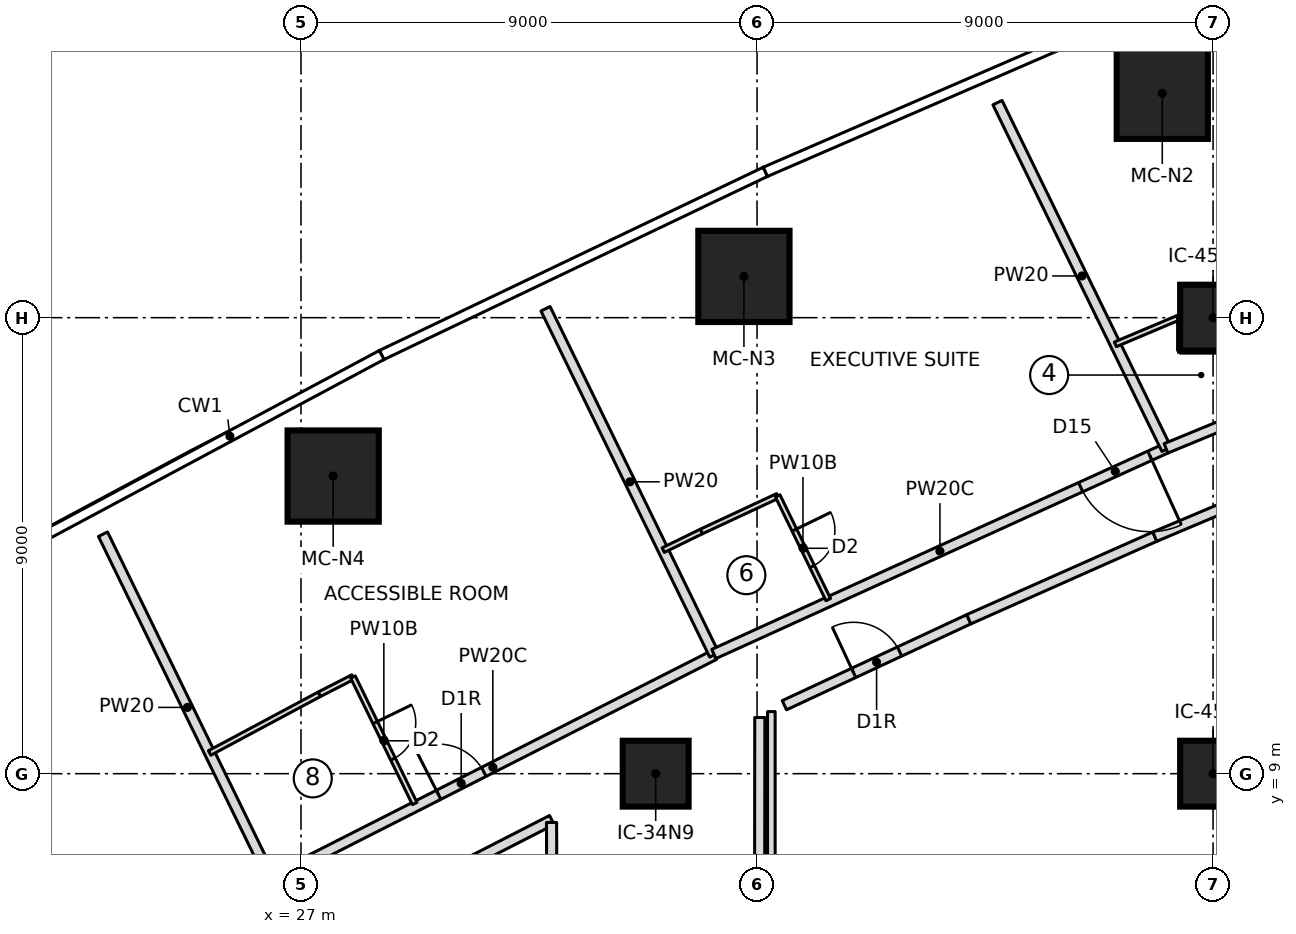
"""IFC4 building model, lengths in metres.
Left out: names, types, materials, properties, quantities, classifications, styles, units other than length and angle.
Written with IfcOpenShell. Run it as: python <this file> out.ifc"""

import sys

from ifc_helpers import new_model, si_unit, direction, frame, frame_2d, origin, origin_2d, place, context, subcontext, project, spatial, rectangle, extrude, element, fill, save


model = new_model("IFC4")
c1 = context("Model", 3, precision=1e-05, world=origin(), true_north=direction((0.0, 1.0)))
c2 = subcontext(c1, "Body", "Model", "MODEL_VIEW")
j1 = project(units=[si_unit("LENGTHUNIT", "METRE"), si_unit("PLANEANGLEUNIT", "RADIAN")], contexts=[c1])
p1 = place(None, origin())
s1 = spatial("IfcSite", under=j1, at=p1, CompositionType="ELEMENT")
p2 = place(p1, origin())
s2 = spatial("IfcBuilding", under=s1, at=p2, CompositionType="ELEMENT")
p3 = place(p2, frame((0.0, 0.0, 57.35)))
s3 = spatial("IfcBuildingStorey", under=s2, at=p3, CompositionType="ELEMENT", Elevation=57.35)
for number, where, z_axis, x_axis in (
    (1, (43.998, 22.428, 0.0), (0.0, 0.0, 1.0), (1.0, 0.0, 0.0)),
    (2, (35.741, 18.814, 0.0), (0.0, 0.0, 1.0), (1.0, 0.0, 0.0)),
    (3, (27.635, 14.874, 0.0), (0.0, 0.0, 1.0), (1.0, 0.0, 0.0)),
):
    element("IfcColumn", number, at=place(p3, frame(where, z_axis=z_axis, x_axis=x_axis)), inside=s3, PredefinedType="COLUMN", context=c2, shape_type="SweptSolid", body=[
        extrude(rectangle(XDim=1.8, YDim=1.8, at=origin_2d()), origin(), (0.0, 0.0, 1.0), 3.55),
    ])
for number, where, z_axis, x_axis in (
    (4, (34.0, 9.0, 0.0), (0.0, 0.0, 1.0), (1.0, 0.0, 0.0)),
    (5, (45.0, 9.0, 0.0), (0.0, 0.0, 1.0), (1.0, 0.0, 0.0)),
    (6, (45.0, 18.0, 0.0), (0.0, 0.0, 1.0), (1.0, 0.0, 0.0)),
):
    element("IfcColumn", number, at=place(p3, frame(where, z_axis=z_axis, x_axis=x_axis)), inside=s3, PredefinedType="COLUMN", context=c2, shape_type="SweptSolid", body=[
        extrude(rectangle(XDim=1.3, YDim=1.3, at=origin_2d()), origin(), (0.0, 0.0, 1.0), 3.55),
    ])
p4 = place(p3, frame((26.425, 6.89, 0.0), z_axis=(0.0, 0.0, 1.0), x_axis=(-0.438202895602, 0.898876088394, 0.0)))
e7 = element("IfcWall", 7, at=p4, inside=s3, PredefinedType="PARTITIONING", context=c2, shape_type="SweptSolid", body=[
    extrude(rectangle(XDim=7.605, YDim=0.2, at=frame_2d((3.803, 0.0))), origin(), (0.0, 0.0, 1.0), 3.25),
])
p5 = place(p3, frame((26.417, 6.908, 0.0), z_axis=(0.0, 0.0, 1.0), x_axis=(0.891700643128, 0.452625632334, 0.0)))
e8 = element("IfcWall", 8, at=p5, inside=s3, PredefinedType="PARTITIONING", context=c2, shape_type="SweptSolid", body=[
    extrude(rectangle(XDim=9.801, YDim=0.2, at=frame_2d((4.901, 0.0))), origin(), (0.0, 0.0, 1.0), 3.25),
])
p6 = place(p5, frame((3.7, 0.0, 0.0)))
e9 = element("IfcOpeningElement", 9, at=p6, cuts=e8, PredefinedType="OPENING", context=c2, shape_type="SweptSolid", body=[
    extrude(rectangle(XDim=1.0, YDim=2.1, at=frame_2d((0.5, 1.05))), frame((0.0, 0.11, 0.0), z_axis=(0.0, -1.0, 0.0), x_axis=(1.0, 0.0, 0.0)), (0.0, 0.0, 1.0), 0.22),
])
p7 = place(p3, frame((25.198, 9.409, 0.0), z_axis=(0.0, 0.0, 1.0), x_axis=(0.881658684569, 0.471887660279, 0.0)))
e10 = element("IfcWall", 10, at=p7, inside=s3, PredefinedType="PARTITIONING", context=c2, shape_type="SweptSolid", body=[
    extrude(rectangle(XDim=2.457, YDim=0.1, at=frame_2d((1.228, 0.0))), origin(), (0.0, 0.0, 1.0), 3.25),
])
p8 = place(p3, frame((27.363, 10.568, 0.0), z_axis=(0.0, 0.0, 1.0), x_axis=(0.890195653003, 0.455578422858, 0.0)))
e11 = element("IfcWall", 11, at=p8, inside=s3, PredefinedType="PARTITIONING", context=c2, shape_type="SweptSolid", body=[
    extrude(rectangle(XDim=0.745, YDim=0.1, at=frame_2d((0.373, 0.0))), origin(), (0.0, 0.0, 1.0), 3.25),
])
p9 = place(p3, frame((28.027, 10.907, 0.0), z_axis=(0.0, 0.0, 1.0), x_axis=(0.438189818179, -0.898882463531, 0.0)))
e12 = element("IfcWall", 12, at=p9, inside=s3, PredefinedType="PARTITIONING", context=c2, shape_type="SweptSolid", body=[
    extrude(rectangle(XDim=2.777, YDim=0.1, at=frame_2d((1.389, 0.0))), origin(), (0.0, 0.0, 1.0), 3.25),
])
p10 = place(p9, frame((1.0, 0.0, 0.0)))
e13 = element("IfcOpeningElement", 13, at=p10, cuts=e12, PredefinedType="OPENING", context=c2, shape_type="SweptSolid", body=[
    extrude(rectangle(XDim=0.8, YDim=2.1, at=frame_2d((0.4, 1.05))), frame((0.0, 0.06, 0.0), z_axis=(0.0, -1.0, 0.0), x_axis=(1.0, 0.0, 0.0)), (0.0, 0.0, 1.0), 0.12),
])
p11 = place(p3, frame((35.156, 11.344, 0.0), z_axis=(0.0, 0.0, 1.0), x_axis=(-0.438196407286, 0.898879251425, 0.0)))
e14 = element("IfcWall", 14, at=p11, inside=s3, PredefinedType="PARTITIONING", context=c2, shape_type="SweptSolid", body=[
    extrude(rectangle(XDim=7.6, YDim=0.2, at=frame_2d((3.8, 0.0))), origin(), (0.0, 0.0, 1.0), 3.25),
])
p12 = place(p3, frame((44.072, 15.421, 0.0), z_axis=(0.0, 0.0, 1.0), x_axis=(-0.910287143541, -0.413977434534, 0.0)))
e15 = element("IfcWall", 15, at=p12, inside=s3, PredefinedType="PARTITIONING", context=c2, shape_type="SweptSolid", body=[
    extrude(rectangle(XDim=9.803, YDim=0.2, at=frame_2d((4.902, 0.0))), origin(), (0.0, 0.0, 1.0), 3.25),
])
p13 = place(p12, frame((0.35, 0.0, 0.0)))
e16 = element("IfcOpeningElement", 16, at=p13, cuts=e15, PredefinedType="OPENING", context=c2, shape_type="SweptSolid", body=[
    extrude(rectangle(XDim=1.5, YDim=2.1, at=frame_2d((0.75, 1.05))), frame((0.0, 0.11, 0.0), z_axis=(0.0, -1.0, 0.0), x_axis=(1.0, 0.0, 0.0)), (0.0, 0.0, 1.0), 0.22),
])
p14 = place(p3, frame((34.148, 13.412, 0.0), z_axis=(0.0, 0.0, 1.0), x_axis=(0.89828999443, 0.43940310184, 0.0)))
e17 = element("IfcWall", 17, at=p14, inside=s3, PredefinedType="PARTITIONING", context=c2, shape_type="SweptSolid", body=[
    extrude(rectangle(XDim=0.84, YDim=0.1, at=frame_2d((0.42, 0.0))), origin(), (0.0, 0.0, 1.0), 3.25),
])
p15 = place(p3, frame((34.903, 13.781, 0.0), z_axis=(0.0, 0.0, 1.0), x_axis=(0.906434605418, 0.422346192242, 0.0)))
e18 = element("IfcWall", 18, at=p15, inside=s3, PredefinedType="PARTITIONING", context=c2, shape_type="SweptSolid", body=[
    extrude(rectangle(XDim=1.661, YDim=0.1, at=frame_2d((0.83, 0.0))), origin(), (0.0, 0.0, 1.0), 3.25),
])
p16 = place(p3, frame((36.408, 14.482, 0.0), z_axis=(0.0, 0.0, 1.0), x_axis=(0.438271544149, -0.898842618921, 0.0)))
e19 = element("IfcWall", 19, at=p16, inside=s3, PredefinedType="PARTITIONING", context=c2, shape_type="SweptSolid", body=[
    extrude(rectangle(XDim=2.277, YDim=0.1, at=frame_2d((1.139, 0.0))), origin(), (0.0, 0.0, 1.0), 3.25),
])
p17 = place(p16, frame((0.75, 0.0, 0.0)))
e20 = element("IfcOpeningElement", 20, at=p17, cuts=e19, PredefinedType="OPENING", context=c2, shape_type="SweptSolid", body=[
    extrude(rectangle(XDim=0.8, YDim=2.1, at=frame_2d((0.4, 1.05))), frame((0.0, 0.06, 0.0), z_axis=(0.0, -1.0, 0.0), x_axis=(1.0, 0.0, 0.0)), (0.0, 0.0, 1.0), 0.12),
])
p18 = place(p3, frame((44.08, 15.403, 0.0), z_axis=(0.0, 0.0, 1.0), x_axis=(-0.438196739796, 0.898879089328, 0.0)))
e21 = element("IfcWall", 21, at=p18, inside=s3, PredefinedType="PARTITIONING", context=c2, shape_type="SweptSolid", body=[
    extrude(rectangle(XDim=7.611, YDim=0.2, at=frame_2d((3.806, 0.0))), origin(), (0.0, 0.0, 1.0), 3.25),
])
p19 = place(p3, frame((43.071, 17.473, 0.0), z_axis=(0.0, 0.0, 1.0), x_axis=(0.921313965742, 0.388819465214, 0.0)))
e22 = element("IfcWall", 22, at=p19, inside=s3, PredefinedType="PARTITIONING", context=c2, shape_type="SweptSolid", body=[
    extrude(rectangle(XDim=1.388, YDim=0.1, at=frame_2d((0.694, 0.0))), origin(), (0.0, 0.0, 1.0), 3.25),
])
p20 = place(p3, frame((44.35, 18.013, 0.0), z_axis=(0.0, 0.0, 1.0), x_axis=(0.0, -1.0, 0.0)))
e23 = element("IfcWall", 23, at=p20, inside=s3, PredefinedType="PARTITIONING", context=c2, shape_type="SweptSolid", body=[
    extrude(rectangle(XDim=0.661, YDim=0.1, at=frame_2d((0.331, 0.0))), origin(), (0.0, 0.0, 1.0), 3.25),
])
p21 = place(p3, frame((44.352, 17.35, 0.0), z_axis=(0.0, 0.0, 1.0), x_axis=(1.0, 0.0, 0.0)))
e24 = element("IfcWall", 24, at=p21, inside=s3, PredefinedType="PARTITIONING", context=c2, shape_type="SweptSolid", body=[
    extrude(rectangle(XDim=1.296, YDim=0.1, at=frame_2d((0.648, 0.0))), origin(), (0.0, 0.0, 1.0), 3.25),
])
p22 = place(p3, frame((29.357, 6.758, 0.0), z_axis=(0.0, 0.0, 1.0), x_axis=(0.890213377055, 0.455543788579, 0.0)))
e25 = element("IfcWall", 25, at=p22, inside=s3, PredefinedType="PARTITIONING", context=c2, shape_type="SweptSolid", body=[
    extrude(rectangle(XDim=2.912, YDim=0.2, at=frame_2d((1.456, 0.0))), origin(), (0.0, 0.0, 1.0), 3.25),
])
p23 = place(p3, frame((36.283, -10.225, 0.0), z_axis=(0.0, 0.0, 1.0), x_axis=(0.0, 1.0, 0.0)))
e26 = element("IfcWall", 26, at=p23, inside=s3, PredefinedType="PARTITIONING", context=c2, shape_type="SweptSolid", body=[
    extrude(rectangle(XDim=20.45, YDim=0.15, at=frame_2d((10.225, 0.0))), origin(), (0.0, 0.0, 1.0), 3.25),
])
p24 = place(p3, frame((36.54, 10.351, 0.0), z_axis=(0.0, 0.0, 1.0), x_axis=(0.906347708834, 0.42253263861, 0.0)))
e27 = element("IfcWall", 27, at=p24, inside=s3, PredefinedType="PARTITIONING", context=c2, shape_type="SweptSolid", body=[
    extrude(rectangle(XDim=4.016, YDim=0.2, at=frame_2d((2.008, 0.0))), origin(), (0.0, 0.0, 1.0), 3.25),
])
p25 = place(p24, frame((1.508, 0.0, 0.0)))
e28 = element("IfcOpeningElement", 28, at=p25, cuts=e27, PredefinedType="OPENING", context=c2, shape_type="SweptSolid", body=[
    extrude(rectangle(XDim=1.0, YDim=2.1, at=frame_2d((0.5, 1.05))), frame((0.0, 0.11, 0.0), z_axis=(0.0, -1.0, 0.0), x_axis=(1.0, 0.0, 0.0)), (0.0, 0.0, 1.0), 0.22),
])
p26 = place(p3, frame((40.18, 12.048, 0.0), z_axis=(0.0, 0.0, 1.0), x_axis=(0.913986953061, 0.405743576209, 0.0)))
e29 = element("IfcWall", 29, at=p26, inside=s3, PredefinedType="PARTITIONING", context=c2, shape_type="SweptSolid", body=[
    extrude(rectangle(XDim=4.016, YDim=0.2, at=frame_2d((2.008, 0.0))), origin(), (0.0, 0.0, 1.0), 3.25),
])
p27 = place(p3, frame((43.85, 13.677, 0.0), z_axis=(0.0, 0.0, 1.0), x_axis=(0.921269894054, 0.388923877269, 0.0)))
e30 = element("IfcWall", 30, at=p27, inside=s3, PredefinedType="PARTITIONING", context=c2, shape_type="SweptSolid", body=[
    extrude(rectangle(XDim=4.016, YDim=0.2, at=frame_2d((2.008, 0.0))), origin(), (0.0, 0.0, 1.0), 3.25),
])
p28 = place(p3, frame((47.704, 16.917, 0.0), z_axis=(0.0, 0.0, 1.0), x_axis=(-0.924573816857, -0.381002962169, 0.0)))
e31 = element("IfcWall", 31, at=p28, inside=s3, PredefinedType="PARTITIONING", context=c2, shape_type="SweptSolid", body=[
    extrude(rectangle(XDim=3.929, YDim=0.2, at=frame_2d((1.964, 0.0))), origin(), (0.0, 0.0, 1.0), 3.25),
])
p29 = place(p28, frame((0.3, 0.0, 0.0)))
e32 = element("IfcOpeningElement", 32, at=p29, cuts=e31, PredefinedType="OPENING", context=c2, shape_type="SweptSolid", body=[
    extrude(rectangle(XDim=1.0, YDim=2.1, at=frame_2d((0.5, 1.05))), frame((0.0, 0.11, 0.0), z_axis=(0.0, -1.0, 0.0), x_axis=(1.0, 0.0, 0.0)), (0.0, 0.0, 1.0), 0.22),
])
p30 = place(p3, frame((31.945, 8.037, 0.0), z_axis=(0.0, 0.0, 1.0), x_axis=(0.003129875123, -0.999995101929, 0.0)))
e33 = element("IfcWall", 33, at=p30, inside=s3, PredefinedType="PARTITIONING", context=c2, shape_type="SweptSolid", body=[
    extrude(rectangle(XDim=1.092, YDim=0.2, at=frame_2d((0.546, 0.0))), origin(), (0.0, 0.0, 1.0), 3.25),
])
p31 = place(p3, frame((36.052, 6.986, 0.0), z_axis=(0.0, 0.0, 1.0), x_axis=(0.000781799464, 0.999999694395, 0.0)))
e34 = element("IfcWall", 34, at=p31, inside=s3, PredefinedType="PARTITIONING", context=c2, shape_type="SweptSolid", body=[
    extrude(rectangle(XDim=3.123, YDim=0.2, at=frame_2d((1.562, 0.0))), origin(), (0.0, 0.0, 1.0), 3.25),
])
p32 = place(p10, origin())
e35 = element("IfcDoor", 35, at=p32, inside=s3, OperationType="SINGLE_SWING_LEFT", PredefinedType="DOOR", context=c2, shape_type="SweptSolid", body=[
    extrude(rectangle(XDim=0.8, YDim=2.1, at=frame_2d((0.4, 1.05))), frame((0.0, 0.025, 0.0), z_axis=(0.0, -1.0, 0.0), x_axis=(1.0, 0.0, 0.0)), (0.0, 0.0, 1.0), 0.05),
])
fill(e13, e35)
p33 = place(p6, origin())
e36 = element("IfcDoor", 36, at=p33, inside=s3, OperationType="SINGLE_SWING_RIGHT", PredefinedType="DOOR", context=c2, shape_type="SweptSolid", body=[
    extrude(rectangle(XDim=1.0, YDim=2.1, at=frame_2d((0.5, 1.05))), frame((0.0, 0.025, 0.0), z_axis=(0.0, -1.0, 0.0), x_axis=(1.0, 0.0, 0.0)), (0.0, 0.0, 1.0), 0.05),
])
fill(e9, e36)
p34 = place(p17, origin())
e37 = element("IfcDoor", 37, at=p34, inside=s3, OperationType="SINGLE_SWING_LEFT", PredefinedType="DOOR", context=c2, shape_type="SweptSolid", body=[
    extrude(rectangle(XDim=0.8, YDim=2.1, at=frame_2d((0.4, 1.05))), frame((0.0, 0.025, 0.0), z_axis=(0.0, -1.0, 0.0), x_axis=(1.0, 0.0, 0.0)), (0.0, 0.0, 1.0), 0.05),
])
fill(e20, e37)
p35 = place(p13, origin())
e38 = element("IfcDoor", 38, at=p35, inside=s3, OperationType="DOUBLE_DOOR_SINGLE_SWING", PredefinedType="DOOR", context=c2, shape_type="SweptSolid", body=[
    extrude(rectangle(XDim=1.5, YDim=2.1, at=frame_2d((0.75, 1.05))), frame((0.0, 0.025, 0.0), z_axis=(0.0, -1.0, 0.0), x_axis=(1.0, 0.0, 0.0)), (0.0, 0.0, 1.0), 0.05),
])
fill(e16, e38)
p36 = place(p25, origin())
e39 = element("IfcDoor", 39, at=p36, inside=s3, OperationType="SINGLE_SWING_RIGHT", PredefinedType="DOOR", context=c2, shape_type="SweptSolid", body=[
    extrude(rectangle(XDim=1.0, YDim=2.1, at=frame_2d((0.5, 1.05))), frame((0.0, 0.025, 0.0), z_axis=(0.0, -1.0, 0.0), x_axis=(1.0, 0.0, 0.0)), (0.0, 0.0, 1.0), 0.05),
])
fill(e28, e39)
save(model, sys.argv[1])
